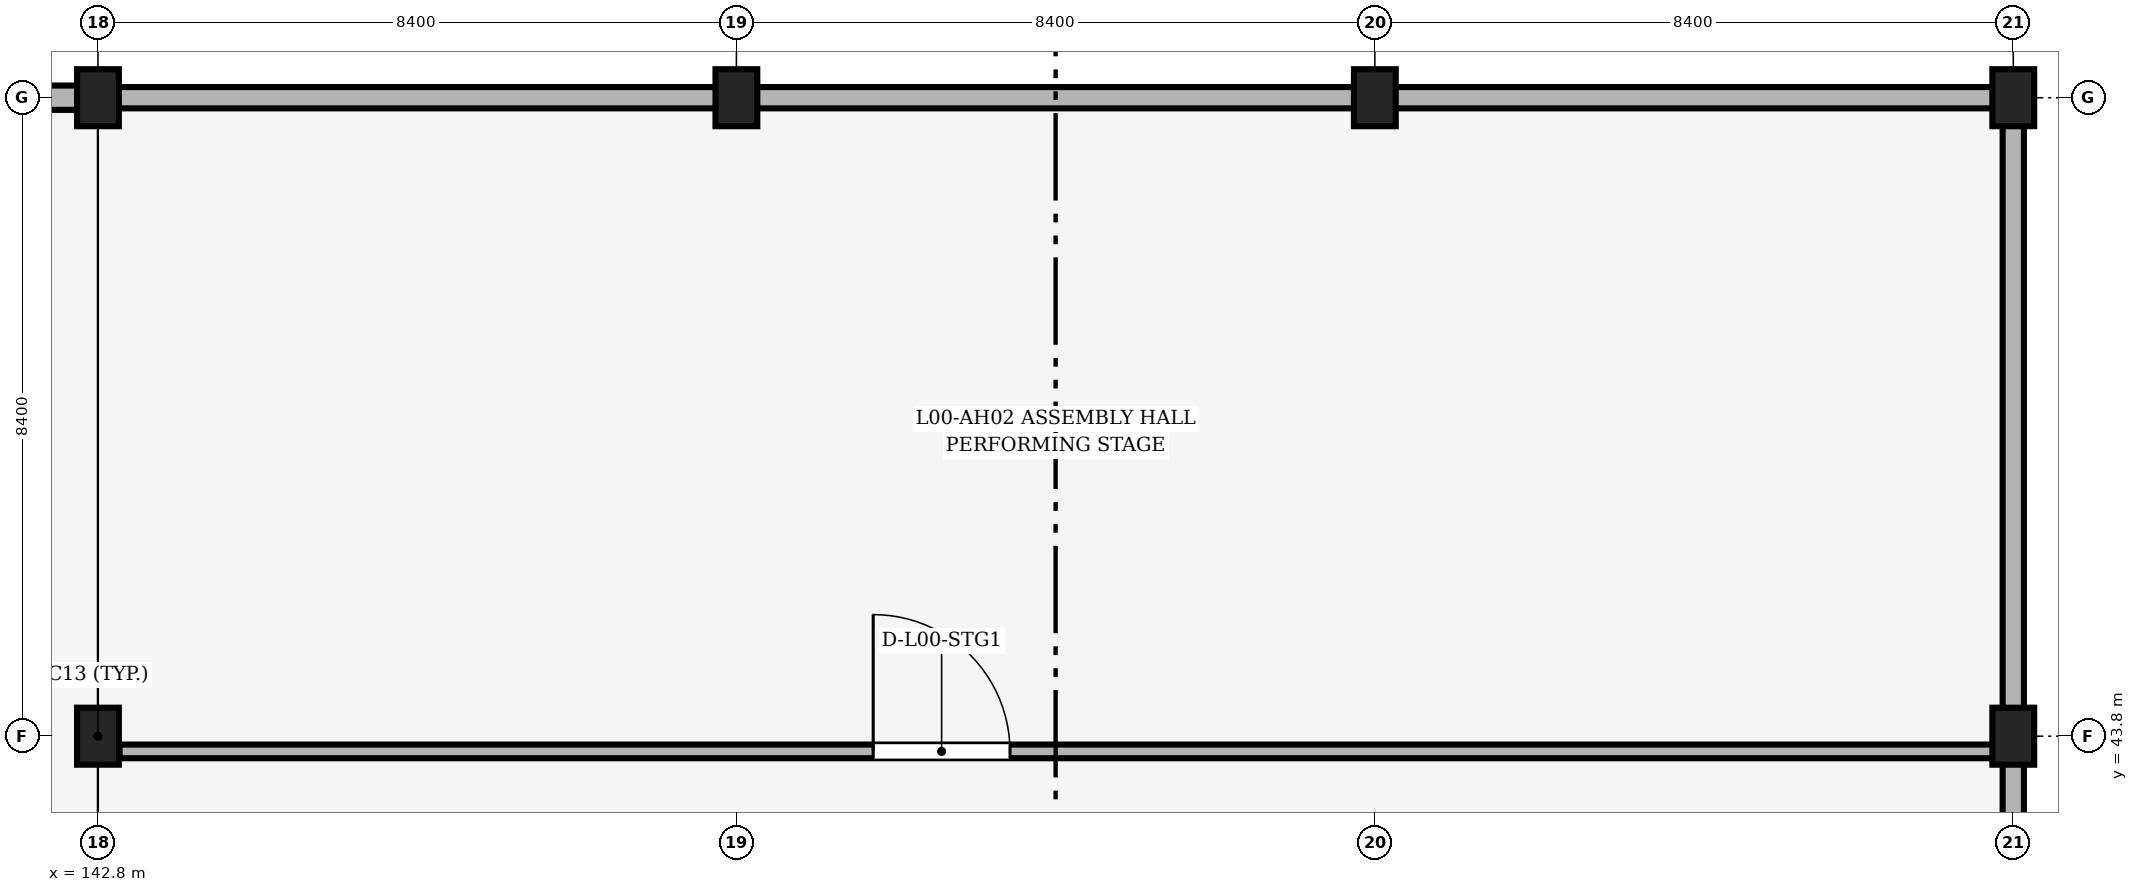
"""IFC4 building model, lengths in metres.
Left out: names, types, materials, properties, quantities, classifications, styles, units other than length and angle.
Written with IfcOpenShell. Run it as: python <this file> out.ifc"""

import sys

from ifc_helpers import new_model, si_unit, direction, frame, frame_2d, origin, origin_2d, place, context, subcontext, project, spatial, rectangle, extrude, element, fill, save


model = new_model("IFC4")
c1 = context("Model", 3, precision=1e-05, world=origin(), true_north=direction((0.0, 1.0)))
c2 = subcontext(c1, "Body", "Model", "MODEL_VIEW")
j1 = project(units=[si_unit("LENGTHUNIT", "METRE"), si_unit("PLANEANGLEUNIT", "RADIAN")], contexts=[c1])
p1 = place(None, origin())
s1 = spatial("IfcSite", under=j1, at=p1, CompositionType="ELEMENT")
p2 = place(p1, origin())
s2 = spatial("IfcBuilding", under=s1, at=p2, CompositionType="ELEMENT")
p3 = place(p2, origin())
s3 = spatial("IfcBuildingStorey", under=s2, at=p3, CompositionType="ELEMENT", Elevation=0.0)
for number, where, z_axis, x_axis in (
    (1, (142.8, 43.8, 0.0), (0.0, 0.0, 1.0), (1.0, 0.0, 0.0)),
    (2, (142.8, 52.2, 0.0), (0.0, 0.0, 1.0), (1.0, 0.0, 0.0)),
    (3, (151.2, 52.2, 0.0), (0.0, 0.0, 1.0), (1.0, 0.0, 0.0)),
    (4, (159.6, 52.2, 0.0), (0.0, 0.0, 1.0), (1.0, 0.0, 0.0)),
    (5, (168.0, 43.8, 0.0), (0.0, 0.0, 1.0), (1.0, 0.0, 0.0)),
    (6, (168.0, 52.2, 0.0), (0.0, 0.0, 1.0), (1.0, 0.0, 0.0)),
):
    element("IfcColumn", number, at=place(p3, frame(where, z_axis=z_axis, x_axis=x_axis)), inside=s3, PredefinedType="COLUMN", context=c2, shape_type="SweptSolid", body=[
        extrude(rectangle(XDim=0.55, YDim=0.75, at=origin_2d()), origin(), (0.0, 0.0, 1.0), 4.8),
    ])
p4 = place(p3, frame((168.0, 35.75, 0.0), z_axis=(0.0, 0.0, 1.0), x_axis=(0.0, 1.0, 0.0)))
e7 = element("IfcWall", 7, at=p4, inside=s3, PredefinedType="SOLIDWALL", context=c2, shape_type="SweptSolid", body=[
    extrude(rectangle(XDim=7.7, YDim=0.28, at=frame_2d((3.85, 0.0))), origin(), (0.0, 0.0, 1.0), 4.267),
])
p5 = place(p3, frame((168.0, 44.15, 0.0), z_axis=(0.0, 0.0, 1.0), x_axis=(0.0, 1.0, 0.0)))
e8 = element("IfcWall", 8, at=p5, inside=s3, PredefinedType="SOLIDWALL", context=c2, shape_type="SweptSolid", body=[
    extrude(rectangle(XDim=7.7, YDim=0.28, at=frame_2d((3.85, 0.0))), origin(), (0.0, 0.0, 1.0), 4.267),
])
p6 = place(p3, frame((143.05, 52.2, 0.0), z_axis=(0.0, 0.0, 1.0), x_axis=(1.0, 0.0, 0.0)))
e9 = element("IfcWall", 9, at=p6, inside=s3, PredefinedType="SOLIDWALL", context=c2, shape_type="SweptSolid", body=[
    extrude(rectangle(XDim=7.9, YDim=0.28, at=frame_2d((3.95, 0.0))), origin(), (0.0, 0.0, 1.0), 4.267),
])
p7 = place(p3, frame((151.45, 52.2, 0.0), z_axis=(0.0, 0.0, 1.0), x_axis=(1.0, 0.0, 0.0)))
e10 = element("IfcWall", 10, at=p7, inside=s3, PredefinedType="SOLIDWALL", context=c2, shape_type="SweptSolid", body=[
    extrude(rectangle(XDim=7.9, YDim=0.28, at=frame_2d((3.95, 0.0))), origin(), (0.0, 0.0, 1.0), 4.267),
])
p8 = place(p3, frame((159.85, 52.2, 0.0), z_axis=(0.0, 0.0, 1.0), x_axis=(1.0, 0.0, 0.0)))
e11 = element("IfcWall", 11, at=p8, inside=s3, PredefinedType="SOLIDWALL", context=c2, shape_type="SweptSolid", body=[
    extrude(rectangle(XDim=7.9, YDim=0.28, at=frame_2d((3.95, 0.0))), origin(), (0.0, 0.0, 1.0), 4.267),
])
p9 = place(p3, frame((134.625, 52.2, 0.0), z_axis=(0.0, 0.0, 1.0), x_axis=(1.0, 0.0, 0.0)))
e12 = element("IfcWall", 12, at=p9, inside=s3, PredefinedType="SOLIDWALL", context=c2, shape_type="SweptSolid", body=[
    extrude(rectangle(XDim=7.925, YDim=0.32, at=frame_2d((3.962, 0.0))), origin(), (0.0, 0.0, 1.0), 4.08),
])
p10 = place(p9, frame((2.262, 0.0, 0.0)))
e13 = element("IfcOpeningElement", 13, at=p10, cuts=e12, PredefinedType="OPENING", context=c2, shape_type="SweptSolid", body=[
    extrude(rectangle(XDim=3.4, YDim=3.2, at=frame_2d((1.7, 1.6))), frame((0.0, 0.17, 0.0), z_axis=(0.0, -1.0, 0.0), x_axis=(1.0, 0.0, 0.0)), (0.0, 0.0, 1.0), 0.34),
])
p11 = place(p3, frame((143.085, 43.6, 0.0), z_axis=(0.0, 0.0, 1.0), x_axis=(1.0, 0.0, 0.0)))
e14 = element("IfcWall", 14, at=p11, inside=s3, PredefinedType="PARTITIONING", context=c2, shape_type="SweptSolid", body=[
    extrude(rectangle(XDim=24.77, YDim=0.18, at=frame_2d((12.385, 0.0))), origin(), (0.0, 0.0, 1.0), 4.5),
])
p12 = place(p11, frame((9.915, 0.0, 0.0)))
e15 = element("IfcOpeningElement", 15, at=p12, cuts=e14, PredefinedType="OPENING", context=c2, shape_type="SweptSolid", body=[
    extrude(rectangle(XDim=1.8, YDim=2.4, at=frame_2d((0.9, 1.2))), frame((0.0, 0.1, 0.0), z_axis=(0.0, -1.0, 0.0), x_axis=(1.0, 0.0, 0.0)), (0.0, 0.0, 1.0), 0.2),
])
p13 = place(p12, origin())
e16 = element("IfcDoor", 16, at=p13, inside=s3, OperationType="DOUBLE_DOOR_SINGLE_SWING", PredefinedType="DOOR", context=c2, shape_type="SweptSolid", body=[
    extrude(rectangle(XDim=1.8, YDim=2.4, at=frame_2d((0.9, 1.2))), frame((0.0, 0.025, 0.0), z_axis=(0.0, -1.0, 0.0), x_axis=(1.0, 0.0, 0.0)), (0.0, 0.0, 1.0), 0.05),
])
fill(e15, e16)
save(model, sys.argv[1])
